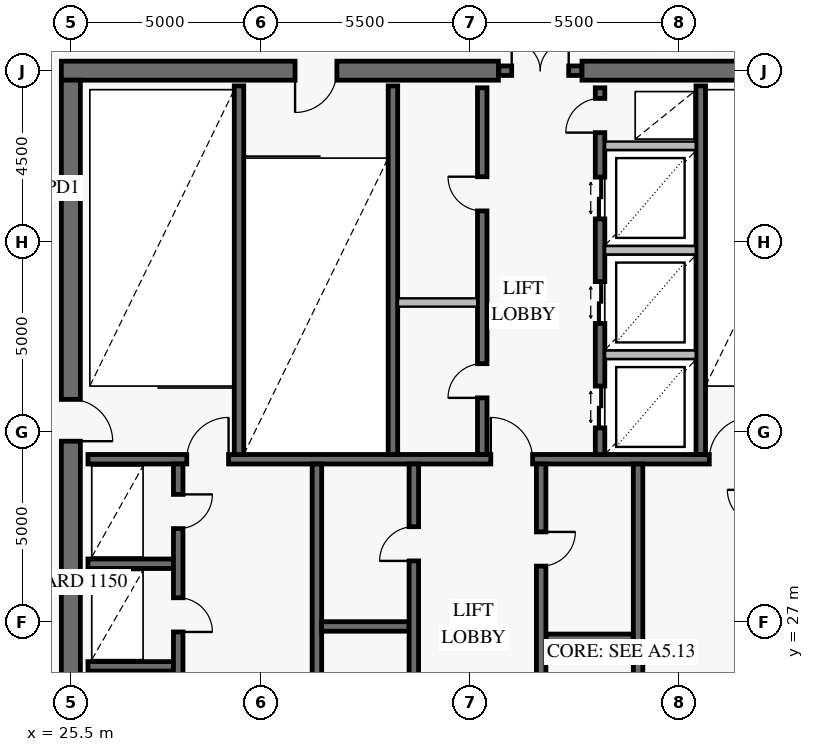
"""IFC4 building model, lengths in metres.
Left out: names, types, materials, properties, quantities, classifications, styles, units other than length and angle.
Written with IfcOpenShell. Run it as: python <this file> out.ifc"""

import sys

from ifc_helpers import new_model, si_unit, direction, frame, frame_2d, origin, place, context, subcontext, project, spatial, rectangle, extrude, element, fill, save


model = new_model("IFC4")
c1 = context("Model", 3, precision=1e-05, world=origin(), true_north=direction((0.0, 1.0)))
c2 = subcontext(c1, "Body", "Model", "MODEL_VIEW")
j1 = project(units=[si_unit("LENGTHUNIT", "METRE"), si_unit("PLANEANGLEUNIT", "RADIAN")], contexts=[c1])
p1 = place(None, origin())
s1 = spatial("IfcSite", under=j1, at=p1, CompositionType="ELEMENT")
p2 = place(p1, origin())
s2 = spatial("IfcBuilding", under=s1, at=p2, CompositionType="ELEMENT")
p3 = place(p2, frame((0.0, 0.0, 357.6)))
s3 = spatial("IfcBuildingStorey", under=s2, at=p3, CompositionType="ELEMENT", Elevation=357.6)
p4 = place(p3, frame((46.75, 41.5, 0.0), z_axis=(0.0, 0.0, 1.0), x_axis=(-1.0, 0.0, 0.0)))
e1 = element("IfcWall", 1, at=p4, inside=s3, PredefinedType="SHEAR", context=c2, shape_type="SweptSolid", body=[
    extrude(rectangle(XDim=7.8, YDim=0.5, at=frame_2d((3.9, 0.0))), origin(), (0.0, 0.0, 1.0), 3.8),
])
p5 = place(p3, frame((36.75, 41.5, 0.0), z_axis=(0.0, 0.0, 1.0), x_axis=(-1.0, 0.0, 0.0)))
e2 = element("IfcWall", 2, at=p5, inside=s3, PredefinedType="SHEAR", context=c2, shape_type="SweptSolid", body=[
    extrude(rectangle(XDim=11.5, YDim=0.5, at=frame_2d((5.75, 0.0))), origin(), (0.0, 0.0, 1.0), 3.8),
])
p6 = place(p5, frame((4.25, 0.0, 0.0)))
e3 = element("IfcOpeningElement", 3, at=p6, cuts=e2, PredefinedType="OPENING", context=c2, shape_type="SweptSolid", body=[
    extrude(rectangle(XDim=1.1, YDim=2.15, at=frame_2d((0.55, 1.075))), frame((0.0, 0.262, 0.0), z_axis=(0.0, -1.0, 0.0), x_axis=(1.0, 0.0, 0.0)), (0.0, 0.0, 1.0), 0.524),
])
p7 = place(p3, frame((25.5, 22.75, 0.0), z_axis=(0.0, 0.0, 1.0), x_axis=(0.0, 1.0, 0.0)))
e4 = element("IfcWall", 4, at=p7, inside=s3, PredefinedType="SHEAR", context=c2, shape_type="SweptSolid", body=[
    extrude(rectangle(XDim=18.5, YDim=0.5, at=frame_2d((9.25, 0.0))), origin(), (0.0, 0.0, 1.0), 3.8),
])
p8 = place(p7, frame((9.0, 0.0, 0.0)))
e5 = element("IfcOpeningElement", 5, at=p8, cuts=e4, PredefinedType="OPENING", context=c2, shape_type="SweptSolid", body=[
    extrude(rectangle(XDim=1.1, YDim=2.15, at=frame_2d((0.55, 1.075))), frame((0.0, 0.262, 0.0), z_axis=(0.0, -1.0, 0.0), x_axis=(1.0, 0.0, 0.0)), (0.0, 0.0, 1.0), 0.524),
])
p9 = place(p3, frame((36.76, 41.5, 0.0), z_axis=(0.0, 0.0, 1.0), x_axis=(1.0, 0.0, 0.0)))
e6 = element("IfcWall", 6, at=p9, inside=s3, PredefinedType="SOLIDWALL", context=c2, shape_type="SweptSolid", body=[
    extrude(rectangle(XDim=2.18, YDim=0.25, at=frame_2d((1.09, 0.0))), origin(), (0.0, 0.0, 1.0), 3.8),
])
p10 = place(p9, frame((0.34, 0.0, 0.0)))
e7 = element("IfcOpeningElement", 7, at=p10, cuts=e6, PredefinedType="OPENING", context=c2, shape_type="SweptSolid", body=[
    extrude(rectangle(XDim=1.5, YDim=2.15, at=frame_2d((0.75, 1.075))), frame((0.0, 0.137, 0.0), z_axis=(0.0, -1.0, 0.0), x_axis=(1.0, 0.0, 0.0)), (0.0, 0.0, 1.0), 0.274),
])
p11 = place(p3, frame((25.95, 31.275, 0.0), z_axis=(0.0, 0.0, 1.0), x_axis=(1.0, 0.0, 0.0)))
e8 = element("IfcWall", 8, at=p11, inside=s3, PredefinedType="SOLIDWALL", context=c2, shape_type="SweptSolid", body=[
    extrude(rectangle(XDim=20.1, YDim=0.25, at=frame_2d((10.05, 0.0))), origin(), (0.0, 0.0, 1.0), 3.8),
])
p12 = place(p11, frame((2.6, 0.0, 0.0)))
e9 = element("IfcOpeningElement", 9, at=p12, cuts=e8, PredefinedType="OPENING", context=c2, shape_type="SweptSolid", body=[
    extrude(rectangle(XDim=1.1, YDim=2.15, at=frame_2d((0.55, 1.075))), frame((0.0, 0.137, 0.0), z_axis=(0.0, -1.0, 0.0), x_axis=(1.0, 0.0, 0.0)), (0.0, 0.0, 1.0), 0.274),
])
p13 = place(p11, frame((10.6, 0.0, 0.0)))
e10 = element("IfcOpeningElement", 10, at=p13, cuts=e8, PredefinedType="OPENING", context=c2, shape_type="SweptSolid", body=[
    extrude(rectangle(XDim=1.1, YDim=2.15, at=frame_2d((0.55, 1.075))), frame((0.0, 0.137, 0.0), z_axis=(0.0, -1.0, 0.0), x_axis=(1.0, 0.0, 0.0)), (0.0, 0.0, 1.0), 0.274),
])
p14 = place(p11, frame((16.35, 0.0, 0.0)))
e11 = element("IfcOpeningElement", 11, at=p14, cuts=e8, PredefinedType="OPENING", context=c2, shape_type="SweptSolid", body=[
    extrude(rectangle(XDim=1.1, YDim=2.15, at=frame_2d((0.55, 1.075))), frame((0.0, 0.137, 0.0), z_axis=(0.0, -1.0, 0.0), x_axis=(1.0, 0.0, 0.0)), (0.0, 0.0, 1.0), 0.274),
])
for number, where, z_axis, x_axis in (
    (12, (29.925, 31.4, 0.0), (0.0, 0.0, 1.0), (0.0, 1.0, 0.0)),
    (13, (33.975, 31.4, 0.0), (0.0, 0.0, 1.0), (0.0, 1.0, 0.0)),
    (14, (42.075, 31.4, 0.0), (0.0, 0.0, 1.0), (0.0, 1.0, 0.0)),
):
    element("IfcWall", number, at=place(p3, frame(where, z_axis=z_axis, x_axis=x_axis)), inside=s3, PredefinedType="SOLIDWALL", context=c2, shape_type="SweptSolid", body=[
        extrude(rectangle(XDim=9.7, YDim=0.25, at=frame_2d((4.85, 0.0))), origin(), (0.0, 0.0, 1.0), 3.8),
    ])
p15 = place(p3, frame((36.325, 31.4, 0.0), z_axis=(0.0, 0.0, 1.0), x_axis=(0.0, 1.0, 0.0)))
e15 = element("IfcWall", 15, at=p15, inside=s3, PredefinedType="SOLIDWALL", context=c2, shape_type="SweptSolid", body=[
    extrude(rectangle(XDim=9.65, YDim=0.25, at=frame_2d((4.825, 0.0))), origin(), (0.0, 0.0, 1.0), 3.8),
])
p16 = place(p15, frame((1.49, 0.0, 0.0)))
e16 = element("IfcOpeningElement", 16, at=p16, cuts=e15, PredefinedType="OPENING", context=c2, shape_type="SweptSolid", body=[
    extrude(rectangle(XDim=0.9, YDim=2.1, at=frame_2d((0.45, 1.05))), frame((0.0, 0.137, 0.0), z_axis=(0.0, -1.0, 0.0), x_axis=(1.0, 0.0, 0.0)), (0.0, 0.0, 1.0), 0.274),
])
p17 = place(p15, frame((6.41, 0.0, 0.0)))
e17 = element("IfcOpeningElement", 17, at=p17, cuts=e15, PredefinedType="OPENING", context=c2, shape_type="SweptSolid", body=[
    extrude(rectangle(XDim=0.9, YDim=2.1, at=frame_2d((0.45, 1.05))), frame((0.0, 0.137, 0.0), z_axis=(0.0, -1.0, 0.0), x_axis=(1.0, 0.0, 0.0)), (0.0, 0.0, 1.0), 0.274),
])
p18 = place(p3, frame((39.425, 31.4, 0.0), z_axis=(0.0, 0.0, 1.0), x_axis=(0.0, 1.0, 0.0)))
e18 = element("IfcWall", 18, at=p18, inside=s3, PredefinedType="SOLIDWALL", context=c2, shape_type="SweptSolid", body=[
    extrude(rectangle(XDim=9.65, YDim=0.25, at=frame_2d((4.825, 0.0))), origin(), (0.0, 0.0, 1.0), 3.8),
])
p19 = place(p18, frame((0.7, 0.0, 0.0)))
e19 = element("IfcOpeningElement", 19, at=p19, cuts=e18, PredefinedType="OPENING", context=c2, shape_type="SweptSolid", body=[
    extrude(rectangle(XDim=1.1, YDim=2.2, at=frame_2d((0.55, 1.1))), frame((0.0, 0.137, 0.0), z_axis=(0.0, -1.0, 0.0), x_axis=(1.0, 0.0, 0.0)), (0.0, 0.0, 1.0), 0.274),
])
p20 = place(p18, frame((3.45, 0.0, 0.0)))
e20 = element("IfcOpeningElement", 20, at=p20, cuts=e18, PredefinedType="OPENING", context=c2, shape_type="SweptSolid", body=[
    extrude(rectangle(XDim=1.1, YDim=2.2, at=frame_2d((0.55, 1.1))), frame((0.0, 0.137, 0.0), z_axis=(0.0, -1.0, 0.0), x_axis=(1.0, 0.0, 0.0)), (0.0, 0.0, 1.0), 0.274),
])
p21 = place(p18, frame((6.2, 0.0, 0.0)))
e21 = element("IfcOpeningElement", 21, at=p21, cuts=e18, PredefinedType="OPENING", context=c2, shape_type="SweptSolid", body=[
    extrude(rectangle(XDim=1.1, YDim=2.2, at=frame_2d((0.55, 1.1))), frame((0.0, 0.137, 0.0), z_axis=(0.0, -1.0, 0.0), x_axis=(1.0, 0.0, 0.0)), (0.0, 0.0, 1.0), 0.274),
])
p22 = place(p18, frame((8.47, 0.0, 0.0)))
e22 = element("IfcOpeningElement", 22, at=p22, cuts=e18, PredefinedType="OPENING", context=c2, shape_type="SweptSolid", body=[
    extrude(rectangle(XDim=0.9, YDim=2.1, at=frame_2d((0.45, 1.05))), frame((0.0, 0.137, 0.0), z_axis=(0.0, -1.0, 0.0), x_axis=(1.0, 0.0, 0.0)), (0.0, 0.0, 1.0), 0.274),
])
for number, where, z_axis, x_axis in (
    (23, (25.95, 25.825, 0.0), (0.0, 0.0, 1.0), (1.0, 0.0, 0.0)),
    (24, (25.95, 28.525, 0.0), (0.0, 0.0, 1.0), (1.0, 0.0, 0.0)),
):
    element("IfcWall", number, at=place(p3, frame(where, z_axis=z_axis, x_axis=x_axis)), inside=s3, PredefinedType="SOLIDWALL", context=c2, shape_type="SweptSolid", body=[
        extrude(rectangle(XDim=2.25, YDim=0.25, at=frame_2d((1.125, 0.0))), origin(), (0.0, 0.0, 1.0), 3.8),
    ])
p23 = place(p3, frame((28.325, 22.95, 0.0), z_axis=(0.0, 0.0, 1.0), x_axis=(0.0, 1.0, 0.0)))
e25 = element("IfcWall", 25, at=p23, inside=s3, PredefinedType="SOLIDWALL", context=c2, shape_type="SweptSolid", body=[
    extrude(rectangle(XDim=8.2, YDim=0.25, at=frame_2d((4.1, 0.0))), origin(), (0.0, 0.0, 1.0), 3.8),
])
p24 = place(p23, frame((0.75, 0.0, 0.0)))
e26 = element("IfcOpeningElement", 26, at=p24, cuts=e25, PredefinedType="OPENING", context=c2, shape_type="SweptSolid", body=[
    extrude(rectangle(XDim=1.3, YDim=2.3, at=frame_2d((0.65, 1.15))), frame((0.0, 0.137, 0.0), z_axis=(0.0, -1.0, 0.0), x_axis=(1.0, 0.0, 0.0)), (0.0, 0.0, 1.0), 0.274),
])
p25 = place(p23, frame((3.78, 0.0, 0.0)))
e27 = element("IfcOpeningElement", 27, at=p25, cuts=e25, PredefinedType="OPENING", context=c2, shape_type="SweptSolid", body=[
    extrude(rectangle(XDim=0.9, YDim=2.1, at=frame_2d((0.45, 1.05))), frame((0.0, 0.137, 0.0), z_axis=(0.0, -1.0, 0.0), x_axis=(1.0, 0.0, 0.0)), (0.0, 0.0, 1.0), 0.274),
])
p26 = place(p23, frame((6.5, 0.0, 0.0)))
e28 = element("IfcOpeningElement", 28, at=p26, cuts=e25, PredefinedType="OPENING", context=c2, shape_type="SweptSolid", body=[
    extrude(rectangle(XDim=0.9, YDim=2.1, at=frame_2d((0.45, 1.05))), frame((0.0, 0.137, 0.0), z_axis=(0.0, -1.0, 0.0), x_axis=(1.0, 0.0, 0.0)), (0.0, 0.0, 1.0), 0.274),
])
p27 = place(p3, frame((31.975, 22.95, 0.0), z_axis=(0.0, 0.0, 1.0), x_axis=(0.0, 1.0, 0.0)))
e29 = element("IfcWall", 29, at=p27, inside=s3, PredefinedType="SOLIDWALL", context=c2, shape_type="SweptSolid", body=[
    extrude(rectangle(XDim=8.2, YDim=0.25, at=frame_2d((4.1, 0.0))), origin(), (0.0, 0.0, 1.0), 3.8),
])
p28 = place(p3, frame((32.1, 26.875, 0.0), z_axis=(0.0, 0.0, 1.0), x_axis=(1.0, 0.0, 0.0)))
e30 = element("IfcWall", 30, at=p28, inside=s3, PredefinedType="SOLIDWALL", context=c2, shape_type="SweptSolid", body=[
    extrude(rectangle(XDim=2.3, YDim=0.25, at=frame_2d((1.15, 0.0))), origin(), (0.0, 0.0, 1.0), 3.8),
])
p29 = place(p3, frame((34.525, 22.95, 0.0), z_axis=(0.0, 0.0, 1.0), x_axis=(0.0, 1.0, 0.0)))
e31 = element("IfcWall", 31, at=p29, inside=s3, PredefinedType="SOLIDWALL", context=c2, shape_type="SweptSolid", body=[
    extrude(rectangle(XDim=8.2, YDim=0.25, at=frame_2d((4.1, 0.0))), origin(), (0.0, 0.0, 1.0), 3.8),
])
p30 = place(p29, frame((1.45, 0.0, 0.0)))
e32 = element("IfcOpeningElement", 32, at=p30, cuts=e31, PredefinedType="OPENING", context=c2, shape_type="SweptSolid", body=[
    extrude(rectangle(XDim=0.9, YDim=2.1, at=frame_2d((0.45, 1.05))), frame((0.0, 0.137, 0.0), z_axis=(0.0, -1.0, 0.0), x_axis=(1.0, 0.0, 0.0)), (0.0, 0.0, 1.0), 0.274),
])
p31 = place(p29, frame((5.65, 0.0, 0.0)))
e33 = element("IfcOpeningElement", 33, at=p31, cuts=e31, PredefinedType="OPENING", context=c2, shape_type="SweptSolid", body=[
    extrude(rectangle(XDim=0.9, YDim=2.1, at=frame_2d((0.45, 1.05))), frame((0.0, 0.137, 0.0), z_axis=(0.0, -1.0, 0.0), x_axis=(1.0, 0.0, 0.0)), (0.0, 0.0, 1.0), 0.274),
])
p32 = place(p3, frame((38.0, 26.55, 0.0), z_axis=(0.0, 0.0, 1.0), x_axis=(1.0, 0.0, 0.0)))
e34 = element("IfcWall", 34, at=p32, inside=s3, PredefinedType="SOLIDWALL", context=c2, shape_type="SweptSolid", body=[
    extrude(rectangle(XDim=2.3, YDim=0.25, at=frame_2d((1.15, 0.0))), origin(), (0.0, 0.0, 1.0), 3.8),
])
p33 = place(p3, frame((37.875, 22.95, 0.0), z_axis=(0.0, 0.0, 1.0), x_axis=(0.0, 1.0, 0.0)))
e35 = element("IfcWall", 35, at=p33, inside=s3, PredefinedType="SOLIDWALL", context=c2, shape_type="SweptSolid", body=[
    extrude(rectangle(XDim=8.2, YDim=0.25, at=frame_2d((4.1, 0.0))), origin(), (0.0, 0.0, 1.0), 3.8),
])
p34 = place(p33, frame((1.312, 0.0, 0.0)))
e36 = element("IfcOpeningElement", 36, at=p34, cuts=e35, PredefinedType="OPENING", context=c2, shape_type="SweptSolid", body=[
    extrude(rectangle(XDim=0.9, YDim=2.1, at=frame_2d((0.45, 1.05))), frame((0.0, 0.137, 0.0), z_axis=(0.0, -1.0, 0.0), x_axis=(1.0, 0.0, 0.0)), (0.0, 0.0, 1.0), 0.274),
])
p35 = place(p33, frame((5.512, 0.0, 0.0)))
e37 = element("IfcOpeningElement", 37, at=p35, cuts=e35, PredefinedType="OPENING", context=c2, shape_type="SweptSolid", body=[
    extrude(rectangle(XDim=0.9, YDim=2.1, at=frame_2d((0.45, 1.05))), frame((0.0, 0.137, 0.0), z_axis=(0.0, -1.0, 0.0), x_axis=(1.0, 0.0, 0.0)), (0.0, 0.0, 1.0), 0.274),
])
p36 = place(p3, frame((40.425, 22.95, 0.0), z_axis=(0.0, 0.0, 1.0), x_axis=(0.0, 1.0, 0.0)))
e38 = element("IfcWall", 38, at=p36, inside=s3, PredefinedType="SOLIDWALL", context=c2, shape_type="SweptSolid", body=[
    extrude(rectangle(XDim=8.2, YDim=0.25, at=frame_2d((4.1, 0.0))), origin(), (0.0, 0.0, 1.0), 3.8),
])
p37 = place(p3, frame((34.108, 35.4, 0.0), z_axis=(0.0, 0.0, 1.0), x_axis=(1.0, 0.0, 0.0)))
e39 = element("IfcWall", 39, at=p37, inside=s3, PredefinedType="PARTITIONING", context=c2, shape_type="SweptSolid", body=[
    extrude(rectangle(XDim=2.084, YDim=0.22, at=frame_2d((1.042, 0.0))), origin(), (0.0, 0.0, 1.0), 3.35),
])
for number, where, z_axis, x_axis in (
    (40, (39.558, 34.025, 0.0), (0.0, 0.0, 1.0), (1.0, 0.0, 0.0)),
    (41, (39.558, 36.775, 0.0), (0.0, 0.0, 1.0), (1.0, 0.0, 0.0)),
    (42, (39.558, 39.525, 0.0), (0.0, 0.0, 1.0), (1.0, 0.0, 0.0)),
):
    element("IfcWall", number, at=place(p3, frame(where, z_axis=z_axis, x_axis=x_axis)), inside=s3, PredefinedType="PARTITIONING", context=c2, shape_type="SweptSolid", body=[
        extrude(rectangle(XDim=2.384, YDim=0.22, at=frame_2d((1.192, 0.0))), origin(), (0.0, 0.0, 1.0), 3.35),
    ])
p38 = place(p8, frame((1.1, 0.0, 0.0), z_axis=(0.0, 0.0, 1.0), x_axis=(-1.0, 0.0, 0.0)))
e43 = element("IfcDoor", 43, at=p38, inside=s3, OperationType="SINGLE_SWING_RIGHT", PredefinedType="USERDEFINED", context=c2, shape_type="SweptSolid", body=[
    extrude(rectangle(XDim=1.1, YDim=2.15, at=frame_2d((0.55, 1.075))), frame((0.0, 0.025, 0.0), z_axis=(0.0, -1.0, 0.0), x_axis=(1.0, 0.0, 0.0)), (0.0, 0.0, 1.0), 0.05),
])
fill(e5, e43)
p39 = place(p6, origin())
e44 = element("IfcDoor", 44, at=p39, inside=s3, OperationType="SINGLE_SWING_RIGHT", PredefinedType="USERDEFINED", context=c2, shape_type="SweptSolid", body=[
    extrude(rectangle(XDim=1.1, YDim=2.15, at=frame_2d((0.55, 1.075))), frame((0.0, 0.025, 0.0), z_axis=(0.0, -1.0, 0.0), x_axis=(1.0, 0.0, 0.0)), (0.0, 0.0, 1.0), 0.05),
])
fill(e3, e44)
p40 = place(p10, origin())
e45 = element("IfcDoor", 45, at=p40, inside=s3, OperationType="DOUBLE_DOOR_SINGLE_SWING", PredefinedType="DOOR", context=c2, shape_type="SweptSolid", body=[
    extrude(rectangle(XDim=1.5, YDim=2.15, at=frame_2d((0.75, 1.075))), frame((0.0, 0.025, 0.0), z_axis=(0.0, -1.0, 0.0), x_axis=(1.0, 0.0, 0.0)), (0.0, 0.0, 1.0), 0.05),
])
fill(e7, e45)
p41 = place(p12, origin())
e46 = element("IfcDoor", 46, at=p41, inside=s3, OperationType="SINGLE_SWING_RIGHT", PredefinedType="USERDEFINED", context=c2, shape_type="SweptSolid", body=[
    extrude(rectangle(XDim=1.1, YDim=2.15, at=frame_2d((0.55, 1.075))), frame((0.0, 0.025, 0.0), z_axis=(0.0, -1.0, 0.0), x_axis=(1.0, 0.0, 0.0)), (0.0, 0.0, 1.0), 0.05),
])
fill(e9, e46)
p42 = place(p13, origin())
e47 = element("IfcDoor", 47, at=p42, inside=s3, OperationType="SINGLE_SWING_LEFT", PredefinedType="USERDEFINED", context=c2, shape_type="SweptSolid", body=[
    extrude(rectangle(XDim=1.1, YDim=2.15, at=frame_2d((0.55, 1.075))), frame((0.0, 0.025, 0.0), z_axis=(0.0, -1.0, 0.0), x_axis=(1.0, 0.0, 0.0)), (0.0, 0.0, 1.0), 0.05),
])
fill(e10, e47)
p43 = place(p14, origin())
e48 = element("IfcDoor", 48, at=p43, inside=s3, OperationType="SINGLE_SWING_RIGHT", PredefinedType="USERDEFINED", context=c2, shape_type="SweptSolid", body=[
    extrude(rectangle(XDim=1.1, YDim=2.15, at=frame_2d((0.55, 1.075))), frame((0.0, 0.025, 0.0), z_axis=(0.0, -1.0, 0.0), x_axis=(1.0, 0.0, 0.0)), (0.0, 0.0, 1.0), 0.05),
])
fill(e11, e48)
p44 = place(p16, origin())
e49 = element("IfcDoor", 49, at=p44, inside=s3, OperationType="SINGLE_SWING_LEFT", PredefinedType="DOOR", context=c2, shape_type="SweptSolid", body=[
    extrude(rectangle(XDim=0.9, YDim=2.1, at=frame_2d((0.45, 1.05))), frame((0.0, 0.025, 0.0), z_axis=(0.0, -1.0, 0.0), x_axis=(1.0, 0.0, 0.0)), (0.0, 0.0, 1.0), 0.05),
])
fill(e16, e49)
p45 = place(p17, origin())
e50 = element("IfcDoor", 50, at=p45, inside=s3, OperationType="SINGLE_SWING_RIGHT", PredefinedType="DOOR", context=c2, shape_type="SweptSolid", body=[
    extrude(rectangle(XDim=0.9, YDim=2.1, at=frame_2d((0.45, 1.05))), frame((0.0, 0.025, 0.0), z_axis=(0.0, -1.0, 0.0), x_axis=(1.0, 0.0, 0.0)), (0.0, 0.0, 1.0), 0.05),
])
fill(e17, e50)
p46 = place(p19, origin())
e51 = element("IfcDoor", 51, at=p46, inside=s3, OperationType="DOUBLE_DOOR_SLIDING", PredefinedType="DOOR", context=c2, shape_type="SweptSolid", body=[
    extrude(rectangle(XDim=1.1, YDim=2.2, at=frame_2d((0.55, 1.1))), frame((0.0, 0.025, 0.0), z_axis=(0.0, -1.0, 0.0), x_axis=(1.0, 0.0, 0.0)), (0.0, 0.0, 1.0), 0.05),
])
fill(e19, e51)
p47 = place(p20, origin())
e52 = element("IfcDoor", 52, at=p47, inside=s3, OperationType="DOUBLE_DOOR_SLIDING", PredefinedType="DOOR", context=c2, shape_type="SweptSolid", body=[
    extrude(rectangle(XDim=1.1, YDim=2.2, at=frame_2d((0.55, 1.1))), frame((0.0, 0.025, 0.0), z_axis=(0.0, -1.0, 0.0), x_axis=(1.0, 0.0, 0.0)), (0.0, 0.0, 1.0), 0.05),
])
fill(e20, e52)
p48 = place(p21, origin())
e53 = element("IfcDoor", 53, at=p48, inside=s3, OperationType="DOUBLE_DOOR_SLIDING", PredefinedType="DOOR", context=c2, shape_type="SweptSolid", body=[
    extrude(rectangle(XDim=1.1, YDim=2.2, at=frame_2d((0.55, 1.1))), frame((0.0, 0.025, 0.0), z_axis=(0.0, -1.0, 0.0), x_axis=(1.0, 0.0, 0.0)), (0.0, 0.0, 1.0), 0.05),
])
fill(e21, e53)
p49 = place(p22, origin())
e54 = element("IfcDoor", 54, at=p49, inside=s3, OperationType="SINGLE_SWING_LEFT", PredefinedType="DOOR", context=c2, shape_type="SweptSolid", body=[
    extrude(rectangle(XDim=0.9, YDim=2.1, at=frame_2d((0.45, 1.05))), frame((0.0, 0.025, 0.0), z_axis=(0.0, -1.0, 0.0), x_axis=(1.0, 0.0, 0.0)), (0.0, 0.0, 1.0), 0.05),
])
fill(e22, e54)
p50 = place(p25, frame((0.9, 0.0, 0.0), z_axis=(0.0, 0.0, 1.0), x_axis=(-1.0, 0.0, 0.0)))
e55 = element("IfcDoor", 55, at=p50, inside=s3, OperationType="SINGLE_SWING_RIGHT", PredefinedType="DOOR", context=c2, shape_type="SweptSolid", body=[
    extrude(rectangle(XDim=0.9, YDim=2.1, at=frame_2d((0.45, 1.05))), frame((0.0, 0.025, 0.0), z_axis=(0.0, -1.0, 0.0), x_axis=(1.0, 0.0, 0.0)), (0.0, 0.0, 1.0), 0.05),
])
fill(e27, e55)
p51 = place(p26, frame((0.9, 0.0, 0.0), z_axis=(0.0, 0.0, 1.0), x_axis=(-1.0, 0.0, 0.0)))
e56 = element("IfcDoor", 56, at=p51, inside=s3, OperationType="SINGLE_SWING_LEFT", PredefinedType="DOOR", context=c2, shape_type="SweptSolid", body=[
    extrude(rectangle(XDim=0.9, YDim=2.1, at=frame_2d((0.45, 1.05))), frame((0.0, 0.025, 0.0), z_axis=(0.0, -1.0, 0.0), x_axis=(1.0, 0.0, 0.0)), (0.0, 0.0, 1.0), 0.05),
])
fill(e28, e56)
p52 = place(p31, origin())
e57 = element("IfcDoor", 57, at=p52, inside=s3, OperationType="SINGLE_SWING_LEFT", PredefinedType="DOOR", context=c2, shape_type="SweptSolid", body=[
    extrude(rectangle(XDim=0.9, YDim=2.1, at=frame_2d((0.45, 1.05))), frame((0.0, 0.025, 0.0), z_axis=(0.0, -1.0, 0.0), x_axis=(1.0, 0.0, 0.0)), (0.0, 0.0, 1.0), 0.05),
])
fill(e33, e57)
p53 = place(p35, frame((0.9, 0.0, 0.0), z_axis=(0.0, 0.0, 1.0), x_axis=(-1.0, 0.0, 0.0)))
e58 = element("IfcDoor", 58, at=p53, inside=s3, OperationType="SINGLE_SWING_LEFT", PredefinedType="DOOR", context=c2, shape_type="SweptSolid", body=[
    extrude(rectangle(XDim=0.9, YDim=2.1, at=frame_2d((0.45, 1.05))), frame((0.0, 0.025, 0.0), z_axis=(0.0, -1.0, 0.0), x_axis=(1.0, 0.0, 0.0)), (0.0, 0.0, 1.0), 0.05),
])
fill(e37, e58)
save(model, sys.argv[1])
